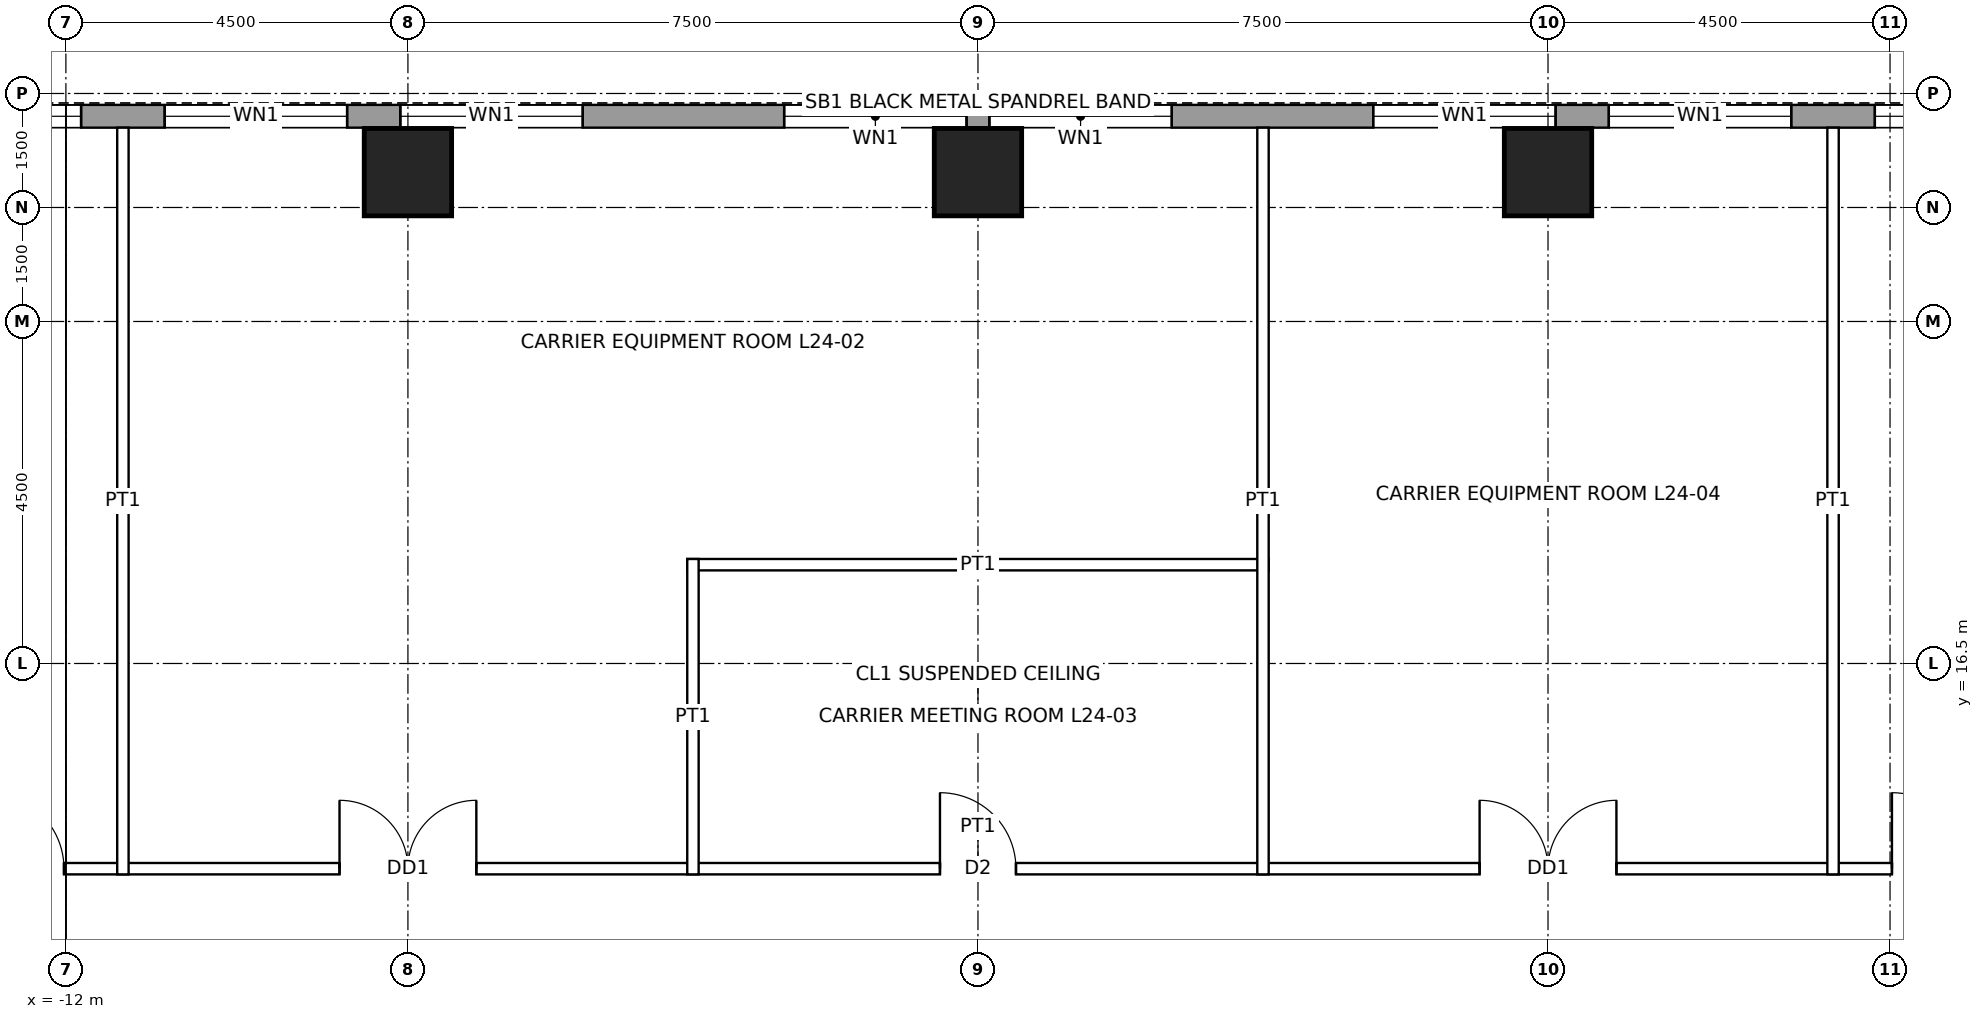
"""IFC4 building model, lengths in metres.
Left out: names, types, materials, properties, quantities, classifications, styles, units other than length and angle.
Written with IfcOpenShell. Run it as: python <this file> out.ifc"""

import sys

from ifc_helpers import new_model, si_unit, direction, frame, frame_2d, origin, origin_2d, place, context, subcontext, project, spatial, rectangle, hollow_rectangle, extrude, element, fill, save


model = new_model("IFC4")
c1 = context("Model", 3, precision=1e-05, world=origin(), true_north=direction((0.0, 1.0)))
c2 = subcontext(c1, "Body", "Model", "MODEL_VIEW")
j1 = project(units=[si_unit("LENGTHUNIT", "METRE"), si_unit("PLANEANGLEUNIT", "RADIAN")], contexts=[c1])
p1 = place(None, origin())
s1 = spatial("IfcSite", under=j1, at=p1, CompositionType="ELEMENT")
p2 = place(p1, origin())
s2 = spatial("IfcBuilding", under=s1, at=p2, CompositionType="ELEMENT")
p3 = place(p2, frame((0.0, 0.0, 122.4)))
s3 = spatial("IfcBuildingStorey", under=s2, at=p3, CompositionType="ELEMENT", Elevation=122.4)
for number, where, z_axis, x_axis in (
    (1, (-7.5, 22.965, 0.0), (0.0, 0.0, 1.0), (1.0, 0.0, 0.0)),
    (2, (0.0, 22.965, 0.0), (0.0, 0.0, 1.0), (1.0, 0.0, 0.0)),
    (3, (7.5, 22.965, 0.0), (0.0, 0.0, 1.0), (1.0, 0.0, 0.0)),
):
    element("IfcColumn", number, at=place(p3, frame(where, z_axis=z_axis, x_axis=x_axis)), inside=s3, PredefinedType="COLUMN", context=c2, shape_type="SweptSolid", body=[
        extrude(hollow_rectangle(XDim=1.15, YDim=1.15, WallThickness=0.075, at=origin_2d()), origin(), (0.0, 0.0, 1.0), 4.5),
    ])
p4 = place(p3, frame((-16.2, 23.7, 0.0), z_axis=(0.0, 0.0, 1.0), x_axis=(1.0, 0.0, 0.0)))
e4 = element("IfcWall", 4, at=p4, inside=s3, PredefinedType="SOLIDWALL", context=c2, shape_type="SweptSolid", body=[
    extrude(rectangle(XDim=32.4, YDim=0.3, at=frame_2d((16.2, 0.0))), origin(), (0.0, 0.0, 1.0), 4.3),
])
p5 = place(p4, frame((2.0, 0.0, 1.0)))
e5 = element("IfcOpeningElement", 5, at=p5, cuts=e4, PredefinedType="OPENING", context=c2, shape_type="SweptSolid", body=[
    extrude(rectangle(XDim=2.4, YDim=1.2, at=frame_2d((1.2, 0.6))), frame((0.0, 0.16, 0.0), z_axis=(0.0, -1.0, 0.0), x_axis=(1.0, 0.0, 0.0)), (0.0, 0.0, 1.0), 0.32),
])
p6 = place(p4, frame((5.5, 0.0, 1.0)))
e6 = element("IfcOpeningElement", 6, at=p6, cuts=e4, PredefinedType="OPENING", context=c2, shape_type="SweptSolid", body=[
    extrude(rectangle(XDim=2.4, YDim=1.2, at=frame_2d((1.2, 0.6))), frame((0.0, 0.16, 0.0), z_axis=(0.0, -1.0, 0.0), x_axis=(1.0, 0.0, 0.0)), (0.0, 0.0, 1.0), 0.32),
])
p7 = place(p4, frame((8.6, 0.0, 1.0)))
e7 = element("IfcOpeningElement", 7, at=p7, cuts=e4, PredefinedType="OPENING", context=c2, shape_type="SweptSolid", body=[
    extrude(rectangle(XDim=2.4, YDim=1.2, at=frame_2d((1.2, 0.6))), frame((0.0, 0.16, 0.0), z_axis=(0.0, -1.0, 0.0), x_axis=(1.0, 0.0, 0.0)), (0.0, 0.0, 1.0), 0.32),
])
p8 = place(p4, frame((13.65, 0.0, 1.0)))
e8 = element("IfcOpeningElement", 8, at=p8, cuts=e4, PredefinedType="OPENING", context=c2, shape_type="SweptSolid", body=[
    extrude(rectangle(XDim=2.4, YDim=1.2, at=frame_2d((1.2, 0.6))), frame((0.0, 0.16, 0.0), z_axis=(0.0, -1.0, 0.0), x_axis=(1.0, 0.0, 0.0)), (0.0, 0.0, 1.0), 0.32),
])
p9 = place(p4, frame((16.35, 0.0, 1.0)))
e9 = element("IfcOpeningElement", 9, at=p9, cuts=e4, PredefinedType="OPENING", context=c2, shape_type="SweptSolid", body=[
    extrude(rectangle(XDim=2.4, YDim=1.2, at=frame_2d((1.2, 0.6))), frame((0.0, 0.16, 0.0), z_axis=(0.0, -1.0, 0.0), x_axis=(1.0, 0.0, 0.0)), (0.0, 0.0, 1.0), 0.32),
])
p10 = place(p4, frame((21.4, 0.0, 1.0)))
e10 = element("IfcOpeningElement", 10, at=p10, cuts=e4, PredefinedType="OPENING", context=c2, shape_type="SweptSolid", body=[
    extrude(rectangle(XDim=2.4, YDim=1.2, at=frame_2d((1.2, 0.6))), frame((0.0, 0.16, 0.0), z_axis=(0.0, -1.0, 0.0), x_axis=(1.0, 0.0, 0.0)), (0.0, 0.0, 1.0), 0.32),
])
p11 = place(p4, frame((24.5, 0.0, 1.0)))
e11 = element("IfcOpeningElement", 11, at=p11, cuts=e4, PredefinedType="OPENING", context=c2, shape_type="SweptSolid", body=[
    extrude(rectangle(XDim=2.4, YDim=1.2, at=frame_2d((1.2, 0.6))), frame((0.0, 0.16, 0.0), z_axis=(0.0, -1.0, 0.0), x_axis=(1.0, 0.0, 0.0)), (0.0, 0.0, 1.0), 0.32),
])
p12 = place(p4, frame((28.0, 0.0, 1.0)))
e12 = element("IfcOpeningElement", 12, at=p12, cuts=e4, PredefinedType="OPENING", context=c2, shape_type="SweptSolid", body=[
    extrude(rectangle(XDim=2.4, YDim=1.2, at=frame_2d((1.2, 0.6))), frame((0.0, 0.16, 0.0), z_axis=(0.0, -1.0, 0.0), x_axis=(1.0, 0.0, 0.0)), (0.0, 0.0, 1.0), 0.32),
])
p13 = place(p3, frame((-13.875, 13.8, 0.0), z_axis=(0.0, 0.0, 1.0), x_axis=(1.0, 0.0, 0.0)))
e13 = element("IfcWall", 13, at=p13, inside=s3, PredefinedType="PARTITIONING", context=c2, shape_type="SweptSolid", body=[
    extrude(rectangle(XDim=27.75, YDim=0.15, at=frame_2d((13.875, 0.0))), origin(), (0.0, 0.0, 1.0), 4.3),
])
p14 = place(p13, frame((5.475, 0.0, 0.0)))
e14 = element("IfcOpeningElement", 14, at=p14, cuts=e13, PredefinedType="OPENING", context=c2, shape_type="SweptSolid", body=[
    extrude(rectangle(XDim=1.8, YDim=2.4, at=frame_2d((0.9, 1.2))), frame((0.0, 0.085, 0.0), z_axis=(0.0, -1.0, 0.0), x_axis=(1.0, 0.0, 0.0)), (0.0, 0.0, 1.0), 0.17),
])
p15 = place(p13, frame((13.375, 0.0, 0.0)))
e15 = element("IfcOpeningElement", 15, at=p15, cuts=e13, PredefinedType="OPENING", context=c2, shape_type="SweptSolid", body=[
    extrude(rectangle(XDim=1.0, YDim=2.1, at=frame_2d((0.5, 1.05))), frame((0.0, 0.085, 0.0), z_axis=(0.0, -1.0, 0.0), x_axis=(1.0, 0.0, 0.0)), (0.0, 0.0, 1.0), 0.17),
])
p16 = place(p13, frame((20.475, 0.0, 0.0)))
e16 = element("IfcOpeningElement", 16, at=p16, cuts=e13, PredefinedType="OPENING", context=c2, shape_type="SweptSolid", body=[
    extrude(rectangle(XDim=1.8, YDim=2.4, at=frame_2d((0.9, 1.2))), frame((0.0, 0.085, 0.0), z_axis=(0.0, -1.0, 0.0), x_axis=(1.0, 0.0, 0.0)), (0.0, 0.0, 1.0), 0.17),
])
p17 = place(p13, frame((25.9, 0.0, 0.0)))
e17 = element("IfcOpeningElement", 17, at=p17, cuts=e13, PredefinedType="OPENING", context=c2, shape_type="SweptSolid", body=[
    extrude(rectangle(XDim=1.0, YDim=2.1, at=frame_2d((0.5, 1.05))), frame((0.0, 0.085, 0.0), z_axis=(0.0, -1.0, 0.0), x_axis=(1.0, 0.0, 0.0)), (0.0, 0.0, 1.0), 0.17),
])
p18 = place(p13, frame((0.85, 0.0, 0.0)))
e18 = element("IfcOpeningElement", 18, at=p18, cuts=e13, PredefinedType="OPENING", context=c2, shape_type="SweptSolid", body=[
    extrude(rectangle(XDim=1.0, YDim=2.1, at=frame_2d((0.5, 1.05))), frame((0.0, 0.085, 0.0), z_axis=(0.0, -1.0, 0.0), x_axis=(1.0, 0.0, 0.0)), (0.0, 0.0, 1.0), 0.17),
])
p19 = place(p3, frame((-3.825, 17.8, 0.0), z_axis=(0.0, 0.0, 1.0), x_axis=(1.0, 0.0, 0.0)))
e19 = element("IfcWall", 19, at=p19, inside=s3, PredefinedType="PARTITIONING", context=c2, shape_type="SweptSolid", body=[
    extrude(rectangle(XDim=7.65, YDim=0.15, at=frame_2d((3.825, 0.0))), origin(), (0.0, 0.0, 1.0), 4.3),
])
p20 = place(p3, frame((-11.25, 13.725, 0.0), z_axis=(0.0, 0.0, 1.0), x_axis=(0.0, 1.0, 0.0)))
e20 = element("IfcWall", 20, at=p20, inside=s3, PredefinedType="PARTITIONING", context=c2, shape_type="SweptSolid", body=[
    extrude(rectangle(XDim=9.825, YDim=0.15, at=frame_2d((4.913, 0.0))), origin(), (0.0, 0.0, 1.0), 3.431),
])
p21 = place(p3, frame((-3.75, 13.725, 0.0), z_axis=(0.0, 0.0, 1.0), x_axis=(0.0, 1.0, 0.0)))
e21 = element("IfcWall", 21, at=p21, inside=s3, PredefinedType="PARTITIONING", context=c2, shape_type="SweptSolid", body=[
    extrude(rectangle(XDim=4.15, YDim=0.15, at=frame_2d((2.075, 0.0))), origin(), (0.0, 0.0, 1.0), 3.431),
])
for number, where, z_axis, x_axis in (
    (22, (3.75, 13.725, 0.0), (0.0, 0.0, 1.0), (0.0, 1.0, 0.0)),
    (23, (11.25, 13.725, 0.0), (0.0, 0.0, 1.0), (0.0, 1.0, 0.0)),
):
    element("IfcWall", number, at=place(p3, frame(where, z_axis=z_axis, x_axis=x_axis)), inside=s3, PredefinedType="PARTITIONING", context=c2, shape_type="SweptSolid", body=[
        extrude(rectangle(XDim=9.825, YDim=0.15, at=frame_2d((4.913, 0.0))), origin(), (0.0, 0.0, 1.0), 3.431),
    ])
p22 = place(p5, origin())
e24 = element("IfcWindow", 24, at=p22, inside=s3, PartitioningType="SINGLE_PANEL", PredefinedType="WINDOW", context=c2, shape_type="SweptSolid", body=[
    extrude(rectangle(XDim=2.4, YDim=1.2, at=frame_2d((1.2, 0.6))), frame((0.0, 0.03, 0.0), z_axis=(0.0, -1.0, 0.0), x_axis=(1.0, 0.0, 0.0)), (0.0, 0.0, 1.0), 0.06),
])
fill(e5, e24)
p23 = place(p6, origin())
e25 = element("IfcWindow", 25, at=p23, inside=s3, PartitioningType="SINGLE_PANEL", PredefinedType="WINDOW", context=c2, shape_type="SweptSolid", body=[
    extrude(rectangle(XDim=2.4, YDim=1.2, at=frame_2d((1.2, 0.6))), frame((0.0, 0.03, 0.0), z_axis=(0.0, -1.0, 0.0), x_axis=(1.0, 0.0, 0.0)), (0.0, 0.0, 1.0), 0.06),
])
fill(e6, e25)
p24 = place(p7, origin())
e26 = element("IfcWindow", 26, at=p24, inside=s3, PartitioningType="SINGLE_PANEL", PredefinedType="WINDOW", context=c2, shape_type="SweptSolid", body=[
    extrude(rectangle(XDim=2.4, YDim=1.2, at=frame_2d((1.2, 0.6))), frame((0.0, 0.03, 0.0), z_axis=(0.0, -1.0, 0.0), x_axis=(1.0, 0.0, 0.0)), (0.0, 0.0, 1.0), 0.06),
])
fill(e7, e26)
p25 = place(p8, origin())
e27 = element("IfcWindow", 27, at=p25, inside=s3, PartitioningType="SINGLE_PANEL", PredefinedType="WINDOW", context=c2, shape_type="SweptSolid", body=[
    extrude(rectangle(XDim=2.4, YDim=1.2, at=frame_2d((1.2, 0.6))), frame((0.0, 0.03, 0.0), z_axis=(0.0, -1.0, 0.0), x_axis=(1.0, 0.0, 0.0)), (0.0, 0.0, 1.0), 0.06),
])
fill(e8, e27)
p26 = place(p9, origin())
e28 = element("IfcWindow", 28, at=p26, inside=s3, PartitioningType="SINGLE_PANEL", PredefinedType="WINDOW", context=c2, shape_type="SweptSolid", body=[
    extrude(rectangle(XDim=2.4, YDim=1.2, at=frame_2d((1.2, 0.6))), frame((0.0, 0.03, 0.0), z_axis=(0.0, -1.0, 0.0), x_axis=(1.0, 0.0, 0.0)), (0.0, 0.0, 1.0), 0.06),
])
fill(e9, e28)
p27 = place(p10, origin())
e29 = element("IfcWindow", 29, at=p27, inside=s3, PartitioningType="SINGLE_PANEL", PredefinedType="WINDOW", context=c2, shape_type="SweptSolid", body=[
    extrude(rectangle(XDim=2.4, YDim=1.2, at=frame_2d((1.2, 0.6))), frame((0.0, 0.03, 0.0), z_axis=(0.0, -1.0, 0.0), x_axis=(1.0, 0.0, 0.0)), (0.0, 0.0, 1.0), 0.06),
])
fill(e10, e29)
p28 = place(p11, origin())
e30 = element("IfcWindow", 30, at=p28, inside=s3, PartitioningType="SINGLE_PANEL", PredefinedType="WINDOW", context=c2, shape_type="SweptSolid", body=[
    extrude(rectangle(XDim=2.4, YDim=1.2, at=frame_2d((1.2, 0.6))), frame((0.0, 0.03, 0.0), z_axis=(0.0, -1.0, 0.0), x_axis=(1.0, 0.0, 0.0)), (0.0, 0.0, 1.0), 0.06),
])
fill(e11, e30)
p29 = place(p12, origin())
e31 = element("IfcWindow", 31, at=p29, inside=s3, PartitioningType="SINGLE_PANEL", PredefinedType="WINDOW", context=c2, shape_type="SweptSolid", body=[
    extrude(rectangle(XDim=2.4, YDim=1.2, at=frame_2d((1.2, 0.6))), frame((0.0, 0.03, 0.0), z_axis=(0.0, -1.0, 0.0), x_axis=(1.0, 0.0, 0.0)), (0.0, 0.0, 1.0), 0.06),
])
fill(e12, e31)
p30 = place(p14, origin())
e32 = element("IfcDoor", 32, at=p30, inside=s3, OperationType="DOUBLE_DOOR_SINGLE_SWING", PredefinedType="DOOR", context=c2, shape_type="SweptSolid", body=[
    extrude(rectangle(XDim=1.8, YDim=2.4, at=frame_2d((0.9, 1.2))), frame((0.0, 0.025, 0.0), z_axis=(0.0, -1.0, 0.0), x_axis=(1.0, 0.0, 0.0)), (0.0, 0.0, 1.0), 0.05),
])
fill(e14, e32)
p31 = place(p15, origin())
e33 = element("IfcDoor", 33, at=p31, inside=s3, OperationType="SINGLE_SWING_LEFT", PredefinedType="DOOR", context=c2, shape_type="SweptSolid", body=[
    extrude(rectangle(XDim=1.0, YDim=2.1, at=frame_2d((0.5, 1.05))), frame((0.0, 0.025, 0.0), z_axis=(0.0, -1.0, 0.0), x_axis=(1.0, 0.0, 0.0)), (0.0, 0.0, 1.0), 0.05),
])
fill(e15, e33)
p32 = place(p16, origin())
e34 = element("IfcDoor", 34, at=p32, inside=s3, OperationType="DOUBLE_DOOR_SINGLE_SWING", PredefinedType="DOOR", context=c2, shape_type="SweptSolid", body=[
    extrude(rectangle(XDim=1.8, YDim=2.4, at=frame_2d((0.9, 1.2))), frame((0.0, 0.025, 0.0), z_axis=(0.0, -1.0, 0.0), x_axis=(1.0, 0.0, 0.0)), (0.0, 0.0, 1.0), 0.05),
])
fill(e16, e34)
p33 = place(p17, origin())
e35 = element("IfcDoor", 35, at=p33, inside=s3, OperationType="SINGLE_SWING_LEFT", PredefinedType="DOOR", context=c2, shape_type="SweptSolid", body=[
    extrude(rectangle(XDim=1.0, YDim=2.1, at=frame_2d((0.5, 1.05))), frame((0.0, 0.025, 0.0), z_axis=(0.0, -1.0, 0.0), x_axis=(1.0, 0.0, 0.0)), (0.0, 0.0, 1.0), 0.05),
])
fill(e17, e35)
p34 = place(p18, origin())
e36 = element("IfcDoor", 36, at=p34, inside=s3, OperationType="SINGLE_SWING_LEFT", PredefinedType="DOOR", context=c2, shape_type="SweptSolid", body=[
    extrude(rectangle(XDim=1.0, YDim=2.1, at=frame_2d((0.5, 1.05))), frame((0.0, 0.025, 0.0), z_axis=(0.0, -1.0, 0.0), x_axis=(1.0, 0.0, 0.0)), (0.0, 0.0, 1.0), 0.05),
])
fill(e18, e36)
save(model, sys.argv[1])
